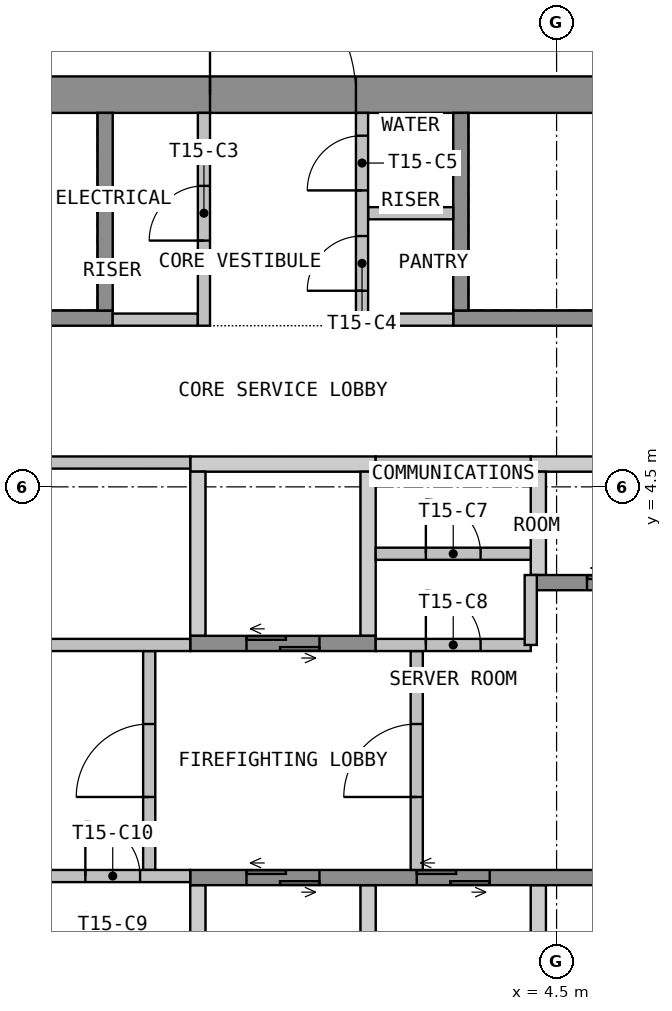
"""IFC4 building model, lengths in metres.
Left out: names, types, materials, properties, quantities, classifications, styles, units other than length and angle.
Written with IfcOpenShell. Run it as: python <this file> out.ifc"""

import sys

from ifc_helpers import new_model, si_unit, direction, frame, frame_2d, origin, place, context, subcontext, project, spatial, polyline, rectangle, outline, extrude, element, fill, save


model = new_model("IFC4")
c1 = context("Model", 3, precision=1e-05, world=origin(), true_north=direction((0.0, 1.0)))
c2 = subcontext(c1, "Body", "Model", "MODEL_VIEW")
j1 = project(units=[si_unit("LENGTHUNIT", "METRE"), si_unit("PLANEANGLEUNIT", "RADIAN")], contexts=[c1])
p1 = place(None, origin())
s1 = spatial("IfcSite", under=j1, at=p1, CompositionType="ELEMENT")
p2 = place(p1, origin())
s2 = spatial("IfcBuilding", under=s1, at=p2, CompositionType="ELEMENT")
p3 = place(p2, frame((0.0, 0.0, 207.3)))
s3 = spatial("IfcBuildingStorey", under=s2, at=p3, CompositionType="ELEMENT", Elevation=207.3)
p4 = place(p3, frame((-13.5, 10.95, 0.0), z_axis=(0.0, 0.0, 1.0), x_axis=(1.0, 0.0, 0.0)))
e1 = element("IfcWall", 1, at=p4, inside=s3, PredefinedType="SHEAR", context=c2, shape_type="SweptSolid", body=[
    extrude(rectangle(XDim=27.0, YDim=0.6, at=frame_2d((13.5, 0.0))), origin(), (0.0, 0.0, 1.0), 3.55),
])
p5 = place(p4, frame((12.3, 0.0, 0.0)))
e2 = element("IfcOpeningElement", 2, at=p5, cuts=e1, PredefinedType="OPENING", context=c2, shape_type="SweptSolid", body=[
    extrude(rectangle(XDim=2.4, YDim=2.1, at=frame_2d((1.2, 1.05))), frame((0.0, 0.31, 0.0), z_axis=(0.0, -1.0, 0.0), x_axis=(1.0, 0.0, 0.0)), (0.0, 0.0, 1.0), 0.62),
])
p6 = place(p4, frame((1.05, 0.0, 0.0)))
e3 = element("IfcOpeningElement", 3, at=p6, cuts=e1, PredefinedType="OPENING", context=c2, shape_type="SweptSolid", body=[
    extrude(rectangle(XDim=1.2, YDim=2.1, at=frame_2d((0.6, 1.05))), frame((0.0, 0.31, 0.0), z_axis=(0.0, -1.0, 0.0), x_axis=(1.0, 0.0, 0.0)), (0.0, 0.0, 1.0), 0.62),
])
p7 = place(p4, frame((24.75, 0.0, 0.0)))
e4 = element("IfcOpeningElement", 4, at=p7, cuts=e1, PredefinedType="OPENING", context=c2, shape_type="SweptSolid", body=[
    extrude(rectangle(XDim=1.2, YDim=2.1, at=frame_2d((0.6, 1.05))), frame((0.0, 0.31, 0.0), z_axis=(0.0, -1.0, 0.0), x_axis=(1.0, 0.0, 0.0)), (0.0, 0.0, 1.0), 0.62),
])
p8 = place(p3, origin())
e5 = element("IfcWall", 5, at=p8, inside=s3, PredefinedType="SHEAR", context=c2, shape_type="SweptSolid", body=[
    extrude(outline(polyline([(-1.525, 4.75), (1.525, 4.75), (1.525, 5.0), (-1.525, 5.0), (-1.525, 4.75)])), origin(), (0.0, 0.0, 1.0), 3.55),
])
p9 = place(p3, origin())
e6 = element("IfcWall", 6, at=p9, inside=s3, PredefinedType="SHEAR", context=c2, shape_type="SweptSolid", body=[
    extrude(outline(polyline([(4.075, 4.75), (12.9, 4.75), (12.9, 5.0), (4.075, 5.0), (4.075, 4.75)])), origin(), (0.0, 0.0, 1.0), 3.55),
])
p10 = place(p3, origin())
e7 = element("IfcWall", 7, at=p10, inside=s3, PredefinedType="SHEAR", context=c2, shape_type="SweptSolid", body=[
    extrude(outline(polyline([(-1.525, 2.05), (-1.275, 2.05), (-1.275, 4.75), (-1.525, 4.75), (-1.525, 2.05)])), origin(), (0.0, 0.0, 1.0), 3.55),
])
p11 = place(p3, origin())
e8 = element("IfcWall", 8, at=p11, inside=s3, PredefinedType="SHEAR", context=c2, shape_type="SweptSolid", body=[
    extrude(outline(polyline([(1.275, 2.05), (1.525, 2.05), (1.525, 4.75), (1.275, 4.75), (1.275, 2.05)])), origin(), (0.0, 0.0, 1.0), 3.55),
])
p12 = place(p3, origin())
e9 = element("IfcWall", 9, at=p12, inside=s3, PredefinedType="SHEAR", context=c2, shape_type="SweptSolid", body=[
    extrude(outline(polyline([(4.075, 3.05), (4.325, 3.05), (4.325, 4.75), (4.075, 4.75), (4.075, 3.05)])), origin(), (0.0, 0.0, 1.0), 3.55),
])
p13 = place(p3, frame((-1.525, 1.925, 0.0), z_axis=(0.0, 0.0, 1.0), x_axis=(1.0, 0.0, 0.0)))
e10 = element("IfcWall", 10, at=p13, inside=s3, PredefinedType="SHEAR", context=c2, shape_type="SweptSolid", body=[
    extrude(rectangle(XDim=3.05, YDim=0.25, at=frame_2d((1.525, 0.0))), origin(), (0.0, 0.0, 1.0), 3.55),
])
p14 = place(p13, frame((0.925, 0.0, 0.0)))
e11 = element("IfcOpeningElement", 11, at=p14, cuts=e10, PredefinedType="OPENING", context=c2, shape_type="SweptSolid", body=[
    extrude(rectangle(XDim=1.2, YDim=2.1, at=frame_2d((0.6, 1.05))), frame((0.0, 0.135, 0.0), z_axis=(0.0, -1.0, 0.0), x_axis=(1.0, 0.0, 0.0)), (0.0, 0.0, 1.0), 0.27),
])
p15 = place(p3, frame((4.075, 2.925, 0.0), z_axis=(0.0, 0.0, 1.0), x_axis=(1.0, 0.0, 0.0)))
e12 = element("IfcWall", 12, at=p15, inside=s3, PredefinedType="SHEAR", context=c2, shape_type="SweptSolid", body=[
    extrude(rectangle(XDim=5.85, YDim=0.25, at=frame_2d((2.925, 0.0))), origin(), (0.0, 0.0, 1.0), 3.55),
])
p16 = place(p15, frame((0.925, 0.0, 0.0)))
e13 = element("IfcOpeningElement", 13, at=p16, cuts=e12, PredefinedType="OPENING", context=c2, shape_type="SweptSolid", body=[
    extrude(rectangle(XDim=1.2, YDim=2.1, at=frame_2d((0.6, 1.05))), frame((0.0, 0.135, 0.0), z_axis=(0.0, -1.0, 0.0), x_axis=(1.0, 0.0, 0.0)), (0.0, 0.0, 1.0), 0.27),
])
p17 = place(p15, frame((3.725, 0.0, 0.0)))
e14 = element("IfcOpeningElement", 14, at=p17, cuts=e12, PredefinedType="OPENING", context=c2, shape_type="SweptSolid", body=[
    extrude(rectangle(XDim=1.2, YDim=2.1, at=frame_2d((0.6, 1.05))), frame((0.0, 0.135, 0.0), z_axis=(0.0, -1.0, 0.0), x_axis=(1.0, 0.0, 0.0)), (0.0, 0.0, 1.0), 0.27),
])
p18 = place(p3, origin())
e15 = element("IfcWall", 15, at=p18, inside=s3, PredefinedType="SHEAR", context=c2, shape_type="SweptSolid", body=[
    extrude(outline(polyline([(-1.525, -4.75), (-1.275, -4.75), (-1.275, -2.05), (-1.525, -2.05), (-1.525, -4.75)])), origin(), (0.0, 0.0, 1.0), 3.55),
])
p19 = place(p3, origin())
e16 = element("IfcWall", 16, at=p19, inside=s3, PredefinedType="SHEAR", context=c2, shape_type="SweptSolid", body=[
    extrude(outline(polyline([(1.275, -4.75), (1.525, -4.75), (1.525, -2.05), (1.275, -2.05), (1.275, -4.75)])), origin(), (0.0, 0.0, 1.0), 3.55),
])
p20 = place(p3, origin())
e17 = element("IfcWall", 17, at=p20, inside=s3, PredefinedType="SHEAR", context=c2, shape_type="SweptSolid", body=[
    extrude(outline(polyline([(4.075, -4.75), (4.325, -4.75), (4.325, -2.05), (4.075, -2.05), (4.075, -4.75)])), origin(), (0.0, 0.0, 1.0), 3.55),
])
p21 = place(p3, frame((-1.525, -1.925, 0.0), z_axis=(0.0, 0.0, 1.0), x_axis=(1.0, 0.0, 0.0)))
e18 = element("IfcWall", 18, at=p21, inside=s3, PredefinedType="SHEAR", context=c2, shape_type="SweptSolid", body=[
    extrude(rectangle(XDim=14.425, YDim=0.25, at=frame_2d((7.212, 0.0))), origin(), (0.0, 0.0, 1.0), 3.55),
])
p22 = place(p21, frame((0.925, 0.0, 0.0)))
e19 = element("IfcOpeningElement", 19, at=p22, cuts=e18, PredefinedType="OPENING", context=c2, shape_type="SweptSolid", body=[
    extrude(rectangle(XDim=1.2, YDim=2.1, at=frame_2d((0.6, 1.05))), frame((0.0, 0.135, 0.0), z_axis=(0.0, -1.0, 0.0), x_axis=(1.0, 0.0, 0.0)), (0.0, 0.0, 1.0), 0.27),
])
p23 = place(p21, frame((3.725, 0.0, 0.0)))
e20 = element("IfcOpeningElement", 20, at=p23, cuts=e18, PredefinedType="OPENING", context=c2, shape_type="SweptSolid", body=[
    extrude(rectangle(XDim=1.2, YDim=2.1, at=frame_2d((0.6, 1.05))), frame((0.0, 0.135, 0.0), z_axis=(0.0, -1.0, 0.0), x_axis=(1.0, 0.0, 0.0)), (0.0, 0.0, 1.0), 0.27),
])
p24 = place(p3, frame((-2.2, -1.8, 0.0), z_axis=(0.0, 0.0, 1.0), x_axis=(0.0, 1.0, 0.0)))
e21 = element("IfcWall", 21, at=p24, inside=s3, PredefinedType="PARTITIONING", context=c2, shape_type="SweptSolid", body=[
    extrude(rectangle(XDim=3.6, YDim=0.2, at=frame_2d((1.8, 0.0))), origin(), (0.0, 0.0, 1.0), 3.55),
])
p25 = place(p24, frame((1.2, 0.0, 0.0)))
e22 = element("IfcOpeningElement", 22, at=p25, cuts=e21, PredefinedType="OPENING", context=c2, shape_type="SweptSolid", body=[
    extrude(rectangle(XDim=1.2, YDim=2.1, at=frame_2d((0.6, 1.05))), frame((0.0, 0.11, 0.0), z_axis=(0.0, -1.0, 0.0), x_axis=(1.0, 0.0, 0.0)), (0.0, 0.0, 1.0), 0.22),
])
p26 = place(p3, frame((2.2, -1.8, 0.0), z_axis=(0.0, 0.0, 1.0), x_axis=(0.0, 1.0, 0.0)))
e23 = element("IfcWall", 23, at=p26, inside=s3, PredefinedType="PARTITIONING", context=c2, shape_type="SweptSolid", body=[
    extrude(rectangle(XDim=3.6, YDim=0.2, at=frame_2d((1.8, 0.0))), origin(), (0.0, 0.0, 1.0), 3.55),
])
p27 = place(p26, frame((1.2, 0.0, 0.0)))
e24 = element("IfcOpeningElement", 24, at=p27, cuts=e23, PredefinedType="OPENING", context=c2, shape_type="SweptSolid", body=[
    extrude(rectangle(XDim=1.2, YDim=2.1, at=frame_2d((0.6, 1.05))), frame((0.0, 0.11, 0.0), z_axis=(0.0, -1.0, 0.0), x_axis=(1.0, 0.0, 0.0)), (0.0, 0.0, 1.0), 0.22),
])
p28 = place(p3, frame((-12.9, 7.275, 0.0), z_axis=(0.0, 0.0, 1.0), x_axis=(1.0, 0.0, 0.0)))
e25 = element("IfcWall", 25, at=p28, inside=s3, PredefinedType="SHEAR", context=c2, shape_type="SweptSolid", body=[
    extrude(rectangle(XDim=10.1, YDim=0.25, at=frame_2d((5.05, 0.0))), origin(), (0.0, 0.0, 1.0), 3.55),
])
p29 = place(p28, frame((0.45, 0.0, 0.0)))
e26 = element("IfcOpeningElement", 26, at=p29, cuts=e25, PredefinedType="OPENING", context=c2, shape_type="SweptSolid", body=[
    extrude(rectangle(XDim=1.2, YDim=2.1, at=frame_2d((0.6, 1.05))), frame((0.0, 0.135, 0.0), z_axis=(0.0, -1.0, 0.0), x_axis=(1.0, 0.0, 0.0)), (0.0, 0.0, 1.0), 0.27),
])
p30 = place(p3, frame((-2.925, 7.4, 0.0), z_axis=(0.0, 0.0, 1.0), x_axis=(0.0, 1.0, 0.0)))
e27 = element("IfcWall", 27, at=p30, inside=s3, PredefinedType="SHEAR", context=c2, shape_type="SweptSolid", body=[
    extrude(rectangle(XDim=3.25, YDim=0.25, at=frame_2d((1.625, 0.0))), origin(), (0.0, 0.0, 1.0), 3.55),
])
p31 = place(p3, frame((2.8, 7.275, 0.0), z_axis=(0.0, 0.0, 1.0), x_axis=(1.0, 0.0, 0.0)))
e28 = element("IfcWall", 28, at=p31, inside=s3, PredefinedType="SHEAR", context=c2, shape_type="SweptSolid", body=[
    extrude(rectangle(XDim=10.1, YDim=0.25, at=frame_2d((5.05, 0.0))), origin(), (0.0, 0.0, 1.0), 3.55),
])
p32 = place(p31, frame((8.45, 0.0, 0.0)))
e29 = element("IfcOpeningElement", 29, at=p32, cuts=e28, PredefinedType="OPENING", context=c2, shape_type="SweptSolid", body=[
    extrude(rectangle(XDim=1.2, YDim=2.1, at=frame_2d((0.6, 1.05))), frame((0.0, 0.135, 0.0), z_axis=(0.0, -1.0, 0.0), x_axis=(1.0, 0.0, 0.0)), (0.0, 0.0, 1.0), 0.27),
])
p33 = place(p3, frame((2.925, 7.4, 0.0), z_axis=(0.0, 0.0, 1.0), x_axis=(0.0, 1.0, 0.0)))
e30 = element("IfcWall", 30, at=p33, inside=s3, PredefinedType="SHEAR", context=c2, shape_type="SweptSolid", body=[
    extrude(rectangle(XDim=3.25, YDim=0.25, at=frame_2d((1.625, 0.0))), origin(), (0.0, 0.0, 1.0), 3.55),
])
for number, where, z_axis, x_axis in (
    (31, (-2.8, 7.25, 0.0), (0.0, 0.0, 1.0), (1.0, 0.0, 0.0)),
    (32, (1.4, 7.25, 0.0), (0.0, 0.0, 1.0), (1.0, 0.0, 0.0)),
    (33, (1.4, 9.0, 0.0), (0.0, 0.0, 1.0), (1.0, 0.0, 0.0)),
):
    element("IfcWall", number, at=place(p3, frame(where, z_axis=z_axis, x_axis=x_axis)), inside=s3, PredefinedType="PARTITIONING", context=c2, shape_type="SweptSolid", body=[
        extrude(rectangle(XDim=1.4, YDim=0.2, at=frame_2d((0.7, 0.0))), origin(), (0.0, 0.0, 1.0), 3.55),
    ])
p34 = place(p3, frame((-1.3, 7.15, 0.0), z_axis=(0.0, 0.0, 1.0), x_axis=(0.0, 1.0, 0.0)))
e34 = element("IfcWall", 34, at=p34, inside=s3, PredefinedType="PARTITIONING", context=c2, shape_type="SweptSolid", body=[
    extrude(rectangle(XDim=3.5, YDim=0.2, at=frame_2d((1.75, 0.0))), origin(), (0.0, 0.0, 1.0), 3.55),
])
p35 = place(p34, frame((1.4, 0.0, 0.0)))
e35 = element("IfcOpeningElement", 35, at=p35, cuts=e34, PredefinedType="OPENING", context=c2, shape_type="SweptSolid", body=[
    extrude(rectangle(XDim=0.9, YDim=2.1, at=frame_2d((0.45, 1.05))), frame((0.0, 0.11, 0.0), z_axis=(0.0, -1.0, 0.0), x_axis=(1.0, 0.0, 0.0)), (0.0, 0.0, 1.0), 0.22),
])
p36 = place(p3, frame((1.3, 7.15, 0.0), z_axis=(0.0, 0.0, 1.0), x_axis=(0.0, 1.0, 0.0)))
e36 = element("IfcWall", 36, at=p36, inside=s3, PredefinedType="PARTITIONING", context=c2, shape_type="SweptSolid", body=[
    extrude(rectangle(XDim=3.5, YDim=0.2, at=frame_2d((1.75, 0.0))), origin(), (0.0, 0.0, 1.0), 3.55),
])
p37 = place(p36, frame((0.575, 0.0, 0.0)))
e37 = element("IfcOpeningElement", 37, at=p37, cuts=e36, PredefinedType="OPENING", context=c2, shape_type="SweptSolid", body=[
    extrude(rectangle(XDim=0.9, YDim=2.1, at=frame_2d((0.45, 1.05))), frame((0.0, 0.11, 0.0), z_axis=(0.0, -1.0, 0.0), x_axis=(1.0, 0.0, 0.0)), (0.0, 0.0, 1.0), 0.22),
])
p38 = place(p36, frame((2.225, 0.0, 0.0)))
e38 = element("IfcOpeningElement", 38, at=p38, cuts=e36, PredefinedType="OPENING", context=c2, shape_type="SweptSolid", body=[
    extrude(rectangle(XDim=0.9, YDim=2.1, at=frame_2d((0.45, 1.05))), frame((0.0, 0.11, 0.0), z_axis=(0.0, -1.0, 0.0), x_axis=(1.0, 0.0, 0.0)), (0.0, 0.0, 1.0), 0.22),
])
p39 = place(p3, frame((-12.9, 1.9, 0.0), z_axis=(0.0, 0.0, 1.0), x_axis=(1.0, 0.0, 0.0)))
e39 = element("IfcWall", 39, at=p39, inside=s3, PredefinedType="PARTITIONING", context=c2, shape_type="SweptSolid", body=[
    extrude(rectangle(XDim=11.375, YDim=0.2, at=frame_2d((5.688, 0.0))), origin(), (0.0, 0.0, 1.0), 3.55),
])
p40 = place(p39, frame((5.087, 0.0, 0.0)))
e40 = element("IfcOpeningElement", 40, at=p40, cuts=e39, PredefinedType="OPENING", context=c2, shape_type="SweptSolid", body=[
    extrude(rectangle(XDim=1.2, YDim=2.1, at=frame_2d((0.6, 1.05))), frame((0.0, 0.11, 0.0), z_axis=(0.0, -1.0, 0.0), x_axis=(1.0, 0.0, 0.0)), (0.0, 0.0, 1.0), 0.22),
])
p41 = place(p3, frame((-12.9, 4.9, 0.0), z_axis=(0.0, 0.0, 1.0), x_axis=(1.0, 0.0, 0.0)))
e41 = element("IfcWall", 41, at=p41, inside=s3, PredefinedType="PARTITIONING", context=c2, shape_type="SweptSolid", body=[
    extrude(rectangle(XDim=11.375, YDim=0.2, at=frame_2d((5.688, 0.0))), origin(), (0.0, 0.0, 1.0), 3.55),
])
p42 = place(p3, frame((1.525, 3.4, 0.0), z_axis=(0.0, 0.0, 1.0), x_axis=(1.0, 0.0, 0.0)))
e42 = element("IfcWall", 42, at=p42, inside=s3, PredefinedType="PARTITIONING", context=c2, shape_type="SweptSolid", body=[
    extrude(rectangle(XDim=2.55, YDim=0.2, at=frame_2d((1.275, 0.0))), origin(), (0.0, 0.0, 1.0), 3.55),
])
p43 = place(p42, frame((0.825, 0.0, 0.0)))
e43 = element("IfcOpeningElement", 43, at=p43, cuts=e42, PredefinedType="OPENING", context=c2, shape_type="SweptSolid", body=[
    extrude(rectangle(XDim=0.9, YDim=2.1, at=frame_2d((0.45, 1.05))), frame((0.0, 0.11, 0.0), z_axis=(0.0, -1.0, 0.0), x_axis=(1.0, 0.0, 0.0)), (0.0, 0.0, 1.0), 0.22),
])
p44 = place(p3, frame((1.525, 1.9, 0.0), z_axis=(0.0, 0.0, 1.0), x_axis=(1.0, 0.0, 0.0)))
e44 = element("IfcWall", 44, at=p44, inside=s3, PredefinedType="PARTITIONING", context=c2, shape_type="SweptSolid", body=[
    extrude(rectangle(XDim=2.55, YDim=0.2, at=frame_2d((1.275, 0.0))), origin(), (0.0, 0.0, 1.0), 3.55),
])
p45 = place(p44, frame((0.825, 0.0, 0.0)))
e45 = element("IfcOpeningElement", 45, at=p45, cuts=e44, PredefinedType="OPENING", context=c2, shape_type="SweptSolid", body=[
    extrude(rectangle(XDim=0.9, YDim=2.1, at=frame_2d((0.45, 1.05))), frame((0.0, 0.11, 0.0), z_axis=(0.0, -1.0, 0.0), x_axis=(1.0, 0.0, 0.0)), (0.0, 0.0, 1.0), 0.22),
])
p46 = place(p3, frame((1.525, 4.9, 0.0), z_axis=(0.0, 0.0, 1.0), x_axis=(1.0, 0.0, 0.0)))
e46 = element("IfcWall", 46, at=p46, inside=s3, PredefinedType="PARTITIONING", context=c2, shape_type="SweptSolid", body=[
    extrude(rectangle(XDim=2.55, YDim=0.2, at=frame_2d((1.275, 0.0))), origin(), (0.0, 0.0, 1.0), 3.55),
])
p47 = place(p3, frame((4.075, 1.9, 0.0), z_axis=(0.0, 0.0, 1.0), x_axis=(0.0, 1.0, 0.0)))
e47 = element("IfcWall", 47, at=p47, inside=s3, PredefinedType="PARTITIONING", context=c2, shape_type="SweptSolid", body=[
    extrude(rectangle(XDim=1.15, YDim=0.2, at=frame_2d((0.575, 0.0))), origin(), (0.0, 0.0, 1.0), 3.55),
])
p48 = place(p3, frame((-4.075, -1.9, 0.0), z_axis=(0.0, 0.0, 1.0), x_axis=(1.0, 0.0, 0.0)))
e48 = element("IfcWall", 48, at=p48, inside=s3, PredefinedType="PARTITIONING", context=c2, shape_type="SweptSolid", body=[
    extrude(rectangle(XDim=2.55, YDim=0.2, at=frame_2d((1.275, 0.0))), origin(), (0.0, 0.0, 1.0), 3.55),
])
p49 = place(p48, frame((0.825, 0.0, 0.0)))
e49 = element("IfcOpeningElement", 49, at=p49, cuts=e48, PredefinedType="OPENING", context=c2, shape_type="SweptSolid", body=[
    extrude(rectangle(XDim=0.9, YDim=2.1, at=frame_2d((0.45, 1.05))), frame((0.0, 0.11, 0.0), z_axis=(0.0, -1.0, 0.0), x_axis=(1.0, 0.0, 0.0)), (0.0, 0.0, 1.0), 0.22),
])
p50 = place(p5, origin())
e50 = element("IfcDoor", 50, at=p50, inside=s3, OperationType="DOUBLE_DOOR_DOUBLE_SWING", PredefinedType="DOOR", context=c2, shape_type="SweptSolid", body=[
    extrude(rectangle(XDim=2.4, YDim=2.1, at=frame_2d((1.2, 1.05))), frame((0.0, 0.025, 0.0), z_axis=(0.0, -1.0, 0.0), x_axis=(1.0, 0.0, 0.0)), (0.0, 0.0, 1.0), 0.05),
])
fill(e2, e50)
p51 = place(p14, origin())
e51 = element("IfcDoor", 51, at=p51, inside=s3, OperationType="DOUBLE_DOOR_SLIDING", PredefinedType="DOOR", context=c2, shape_type="SweptSolid", body=[
    extrude(rectangle(XDim=1.2, YDim=2.1, at=frame_2d((0.6, 1.05))), frame((0.0, 0.025, 0.0), z_axis=(0.0, -1.0, 0.0), x_axis=(1.0, 0.0, 0.0)), (0.0, 0.0, 1.0), 0.05),
])
fill(e11, e51)
p52 = place(p16, origin())
e52 = element("IfcDoor", 52, at=p52, inside=s3, OperationType="DOUBLE_DOOR_SLIDING", PredefinedType="DOOR", context=c2, shape_type="SweptSolid", body=[
    extrude(rectangle(XDim=1.2, YDim=2.1, at=frame_2d((0.6, 1.05))), frame((0.0, 0.025, 0.0), z_axis=(0.0, -1.0, 0.0), x_axis=(1.0, 0.0, 0.0)), (0.0, 0.0, 1.0), 0.05),
])
fill(e13, e52)
p53 = place(p22, origin())
e53 = element("IfcDoor", 53, at=p53, inside=s3, OperationType="DOUBLE_DOOR_SLIDING", PredefinedType="DOOR", context=c2, shape_type="SweptSolid", body=[
    extrude(rectangle(XDim=1.2, YDim=2.1, at=frame_2d((0.6, 1.05))), frame((0.0, 0.025, 0.0), z_axis=(0.0, -1.0, 0.0), x_axis=(1.0, 0.0, 0.0)), (0.0, 0.0, 1.0), 0.05),
])
fill(e19, e53)
p54 = place(p23, origin())
e54 = element("IfcDoor", 54, at=p54, inside=s3, OperationType="DOUBLE_DOOR_SLIDING", PredefinedType="DOOR", context=c2, shape_type="SweptSolid", body=[
    extrude(rectangle(XDim=1.2, YDim=2.1, at=frame_2d((0.6, 1.05))), frame((0.0, 0.025, 0.0), z_axis=(0.0, -1.0, 0.0), x_axis=(1.0, 0.0, 0.0)), (0.0, 0.0, 1.0), 0.05),
])
fill(e20, e54)
p55 = place(p25, origin())
e55 = element("IfcDoor", 55, at=p55, inside=s3, OperationType="SINGLE_SWING_LEFT", PredefinedType="DOOR", context=c2, shape_type="SweptSolid", body=[
    extrude(rectangle(XDim=1.2, YDim=2.1, at=frame_2d((0.6, 1.05))), frame((0.0, 0.025, 0.0), z_axis=(0.0, -1.0, 0.0), x_axis=(1.0, 0.0, 0.0)), (0.0, 0.0, 1.0), 0.05),
])
fill(e22, e55)
p56 = place(p27, origin())
e56 = element("IfcDoor", 56, at=p56, inside=s3, OperationType="SINGLE_SWING_LEFT", PredefinedType="DOOR", context=c2, shape_type="SweptSolid", body=[
    extrude(rectangle(XDim=1.2, YDim=2.1, at=frame_2d((0.6, 1.05))), frame((0.0, 0.025, 0.0), z_axis=(0.0, -1.0, 0.0), x_axis=(1.0, 0.0, 0.0)), (0.0, 0.0, 1.0), 0.05),
])
fill(e24, e56)
p57 = place(p35, origin())
e57 = element("IfcDoor", 57, at=p57, inside=s3, OperationType="SINGLE_SWING_LEFT", PredefinedType="DOOR", context=c2, shape_type="SweptSolid", body=[
    extrude(rectangle(XDim=0.9, YDim=2.1, at=frame_2d((0.45, 1.05))), frame((0.0, 0.025, 0.0), z_axis=(0.0, -1.0, 0.0), x_axis=(1.0, 0.0, 0.0)), (0.0, 0.0, 1.0), 0.05),
])
fill(e35, e57)
p58 = place(p37, origin())
e58 = element("IfcDoor", 58, at=p58, inside=s3, OperationType="SINGLE_SWING_LEFT", PredefinedType="DOOR", context=c2, shape_type="SweptSolid", body=[
    extrude(rectangle(XDim=0.9, YDim=2.1, at=frame_2d((0.45, 1.05))), frame((0.0, 0.025, 0.0), z_axis=(0.0, -1.0, 0.0), x_axis=(1.0, 0.0, 0.0)), (0.0, 0.0, 1.0), 0.05),
])
fill(e37, e58)
p59 = place(p38, origin())
e59 = element("IfcDoor", 59, at=p59, inside=s3, OperationType="SINGLE_SWING_LEFT", PredefinedType="DOOR", context=c2, shape_type="SweptSolid", body=[
    extrude(rectangle(XDim=0.9, YDim=2.1, at=frame_2d((0.45, 1.05))), frame((0.0, 0.025, 0.0), z_axis=(0.0, -1.0, 0.0), x_axis=(1.0, 0.0, 0.0)), (0.0, 0.0, 1.0), 0.05),
])
fill(e38, e59)
p60 = place(p43, origin())
e60 = element("IfcDoor", 60, at=p60, inside=s3, OperationType="SINGLE_SWING_LEFT", PredefinedType="DOOR", context=c2, shape_type="SweptSolid", body=[
    extrude(rectangle(XDim=0.9, YDim=2.1, at=frame_2d((0.45, 1.05))), frame((0.0, 0.025, 0.0), z_axis=(0.0, -1.0, 0.0), x_axis=(1.0, 0.0, 0.0)), (0.0, 0.0, 1.0), 0.05),
])
fill(e43, e60)
p61 = place(p45, origin())
e61 = element("IfcDoor", 61, at=p61, inside=s3, OperationType="SINGLE_SWING_LEFT", PredefinedType="DOOR", context=c2, shape_type="SweptSolid", body=[
    extrude(rectangle(XDim=0.9, YDim=2.1, at=frame_2d((0.45, 1.05))), frame((0.0, 0.025, 0.0), z_axis=(0.0, -1.0, 0.0), x_axis=(1.0, 0.0, 0.0)), (0.0, 0.0, 1.0), 0.05),
])
fill(e45, e61)
p62 = place(p49, origin())
e62 = element("IfcDoor", 62, at=p62, inside=s3, OperationType="SINGLE_SWING_LEFT", PredefinedType="DOOR", context=c2, shape_type="SweptSolid", body=[
    extrude(rectangle(XDim=0.9, YDim=2.1, at=frame_2d((0.45, 1.05))), frame((0.0, 0.025, 0.0), z_axis=(0.0, -1.0, 0.0), x_axis=(1.0, 0.0, 0.0)), (0.0, 0.0, 1.0), 0.05),
])
fill(e49, e62)
save(model, sys.argv[1])
